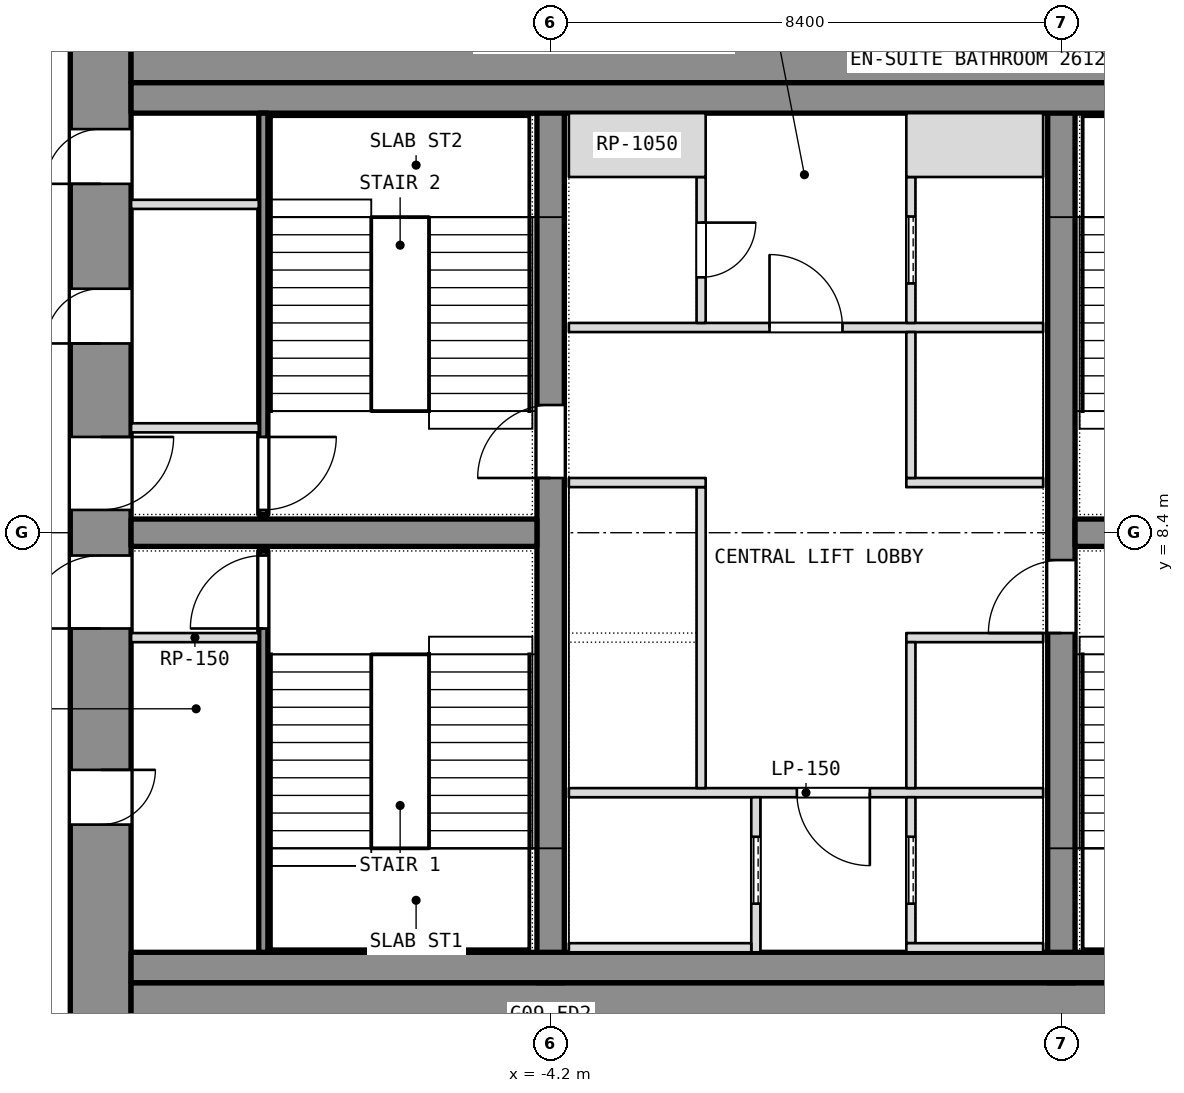
"""IFC4 building model, lengths in metres.
Left out: names, types, materials, properties, quantities, classifications, styles, units other than length and angle.
Written with IfcOpenShell. Run it as: python <this file> out.ifc"""

import sys

from ifc_helpers import new_model, si_unit, direction, frame, frame_2d, origin, place, context, subcontext, project, spatial, rectangle, extrude, element, fill, save


model = new_model("IFC4")
c1 = context("Model", 3, precision=1e-05, world=origin(), true_north=direction((0.0, 1.0)))
c2 = subcontext(c1, "Body", "Model", "MODEL_VIEW")
j1 = project(units=[si_unit("LENGTHUNIT", "METRE"), si_unit("PLANEANGLEUNIT", "RADIAN")], contexts=[c1])
p1 = place(None, origin())
s1 = spatial("IfcSite", under=j1, at=p1, CompositionType="ELEMENT")
p2 = place(p1, origin())
s2 = spatial("IfcBuilding", under=s1, at=p2, CompositionType="ELEMENT")
p3 = place(p2, frame((0.0, 0.0, 119.3)))
s3 = spatial("IfcBuildingStorey", under=s2, at=p3, CompositionType="ELEMENT", Elevation=119.3)
p4 = place(p3, frame((-11.6, 0.0, 0.0), z_axis=(0.0, 0.0, 1.0), x_axis=(0.0, 1.0, 0.0)))
e1 = element("IfcWall", 1, at=p4, inside=s3, PredefinedType="SHEAR", context=c2, shape_type="SweptSolid", body=[
    extrude(rectangle(XDim=16.8, YDim=1.0, at=frame_2d((8.4, 0.0))), origin(), (0.0, 0.0, 1.0), 3.6),
])
p5 = place(p4, frame((3.6, 0.0, 0.0)))
e2 = element("IfcOpeningElement", 2, at=p5, cuts=e1, PredefinedType="OPENING", context=c2, shape_type="SweptSolid", body=[
    extrude(rectangle(XDim=0.9, YDim=2.1, at=frame_2d((0.45, 1.05))), frame((0.0, 0.5, 0.0), z_axis=(0.0, -1.0, 0.0), x_axis=(1.0, 0.0, 0.0)), (0.0, 0.0, 1.0), 1.0),
])
p6 = place(p4, frame((6.825, 0.0, 0.0)))
e3 = element("IfcOpeningElement", 3, at=p6, cuts=e1, PredefinedType="OPENING", context=c2, shape_type="SweptSolid", body=[
    extrude(rectangle(XDim=1.2, YDim=2.1, at=frame_2d((0.6, 1.05))), frame((0.0, 0.5, 0.0), z_axis=(0.0, -1.0, 0.0), x_axis=(1.0, 0.0, 0.0)), (0.0, 0.0, 1.0), 1.0),
])
p7 = place(p4, frame((14.137, 0.0, 0.0)))
e4 = element("IfcOpeningElement", 4, at=p7, cuts=e1, PredefinedType="OPENING", context=c2, shape_type="SweptSolid", body=[
    extrude(rectangle(XDim=0.9, YDim=2.1, at=frame_2d((0.45, 1.05))), frame((0.0, 0.5, 0.0), z_axis=(0.0, -1.0, 0.0), x_axis=(1.0, 0.0, 0.0)), (0.0, 0.0, 1.0), 1.0),
])
p8 = place(p4, frame((11.512, 0.0, 0.0)))
e5 = element("IfcOpeningElement", 5, at=p8, cuts=e1, PredefinedType="OPENING", context=c2, shape_type="SweptSolid", body=[
    extrude(rectangle(XDim=0.9, YDim=2.1, at=frame_2d((0.45, 1.05))), frame((0.0, 0.5, 0.0), z_axis=(0.0, -1.0, 0.0), x_axis=(1.0, 0.0, 0.0)), (0.0, 0.0, 1.0), 1.0),
])
p9 = place(p4, frame((8.775, 0.0, 0.0)))
e6 = element("IfcOpeningElement", 6, at=p9, cuts=e1, PredefinedType="OPENING", context=c2, shape_type="SweptSolid", body=[
    extrude(rectangle(XDim=1.2, YDim=2.1, at=frame_2d((0.6, 1.05))), frame((0.0, 0.5, 0.0), z_axis=(0.0, -1.0, 0.0), x_axis=(1.0, 0.0, 0.0)), (0.0, 0.0, 1.0), 1.0),
])
for number, where, z_axis, x_axis in (
    (7, (-11.1, 0.5, 0.0), (0.0, 0.0, 1.0), (1.0, 0.0, 0.0)),
    (8, (-11.1, 16.3, 0.0), (0.0, 0.0, 1.0), (1.0, 0.0, 0.0)),
):
    element("IfcWall", number, at=place(p3, frame(where, z_axis=z_axis, x_axis=x_axis)), inside=s3, PredefinedType="SHEAR", context=c2, shape_type="SweptSolid", body=[
        extrude(rectangle(XDim=22.2, YDim=1.0, at=frame_2d((11.1, 0.0))), origin(), (0.0, 0.0, 1.0), 3.6),
    ])
p10 = place(p3, frame((-4.2, 1.0, 0.0), z_axis=(0.0, 0.0, 1.0), x_axis=(0.0, 1.0, 0.0)))
e9 = element("IfcWall", 9, at=p10, inside=s3, PredefinedType="SHEAR", context=c2, shape_type="SweptSolid", body=[
    extrude(rectangle(XDim=14.8, YDim=0.45, at=frame_2d((7.4, 0.0))), origin(), (0.0, 0.0, 1.0), 3.6),
])
p11 = place(p10, frame((8.3, 0.0, 0.0)))
e10 = element("IfcOpeningElement", 10, at=p11, cuts=e9, PredefinedType="OPENING", context=c2, shape_type="SweptSolid", body=[
    extrude(rectangle(XDim=1.2, YDim=2.1, at=frame_2d((0.6, 1.05))), frame((0.0, 0.225, 0.0), z_axis=(0.0, -1.0, 0.0), x_axis=(1.0, 0.0, 0.0)), (0.0, 0.0, 1.0), 0.45),
])
p12 = place(p3, frame((4.2, 1.0, 0.0), z_axis=(0.0, 0.0, 1.0), x_axis=(0.0, 1.0, 0.0)))
e11 = element("IfcWall", 11, at=p12, inside=s3, PredefinedType="SHEAR", context=c2, shape_type="SweptSolid", body=[
    extrude(rectangle(XDim=14.8, YDim=0.45, at=frame_2d((7.4, 0.0))), origin(), (0.0, 0.0, 1.0), 3.6),
])
p13 = place(p12, frame((5.75, 0.0, 0.0)))
e12 = element("IfcOpeningElement", 12, at=p13, cuts=e11, PredefinedType="OPENING", context=c2, shape_type="SweptSolid", body=[
    extrude(rectangle(XDim=1.2, YDim=2.1, at=frame_2d((0.6, 1.05))), frame((0.0, 0.225, 0.0), z_axis=(0.0, -1.0, 0.0), x_axis=(1.0, 0.0, 0.0)), (0.0, 0.0, 1.0), 0.45),
])
for number, where, z_axis, x_axis in (
    (13, (-11.1, 8.4, 0.0), (0.0, 0.0, 1.0), (1.0, 0.0, 0.0)),
    (14, (4.425, 8.4, 0.0), (0.0, 0.0, 1.0), (1.0, 0.0, 0.0)),
):
    element("IfcWall", number, at=place(p3, frame(where, z_axis=z_axis, x_axis=x_axis)), inside=s3, PredefinedType="SHEAR", context=c2, shape_type="SweptSolid", body=[
        extrude(rectangle(XDim=6.675, YDim=0.45, at=frame_2d((3.337, 0.0))), origin(), (0.0, 0.0, 1.0), 3.6),
    ])
for number, where, z_axis, x_axis in (
    (15, (-11.1, 1.25, 0.0), (0.0, 0.0, 1.0), (1.0, 0.0, 0.0)),
    (16, (-11.1, 15.55, 0.0), (0.0, 0.0, 1.0), (1.0, 0.0, 0.0)),
):
    element("IfcWall", number, at=place(p3, frame(where, z_axis=z_axis, x_axis=x_axis)), inside=s3, PredefinedType="PARTITIONING", context=c2, shape_type="SweptSolid", body=[
        extrude(rectangle(XDim=22.2, YDim=0.5, at=frame_2d((11.1, 0.0))), origin(), (0.0, 0.0, 1.0), 3.34),
    ])
p14 = place(p3, frame((-8.925, 1.5, 0.0), z_axis=(0.0, 0.0, 1.0), x_axis=(0.0, 1.0, 0.0)))
e17 = element("IfcWall", 17, at=p14, inside=s3, PredefinedType="SHEAR", context=c2, shape_type="SweptSolid", body=[
    extrude(rectangle(XDim=6.6, YDim=0.15, at=frame_2d((3.3, 0.0))), origin(), (0.0, 0.0, 1.0), 3.34),
])
p15 = place(p14, frame((5.325, 0.0, 0.0)))
e18 = element("IfcOpeningElement", 18, at=p15, cuts=e17, PredefinedType="OPENING", context=c2, shape_type="SweptSolid", body=[
    extrude(rectangle(XDim=1.2, YDim=2.1, at=frame_2d((0.6, 1.05))), frame((0.0, 0.075, 0.0), z_axis=(0.0, -1.0, 0.0), x_axis=(1.0, 0.0, 0.0)), (0.0, 0.0, 1.0), 0.15),
])
p16 = place(p3, frame((-11.1, 6.675, 0.0), z_axis=(0.0, 0.0, 1.0), x_axis=(1.0, 0.0, 0.0)))
e19 = element("IfcWall", 19, at=p16, inside=s3, PredefinedType="PARTITIONING", context=c2, shape_type="SweptSolid", body=[
    extrude(rectangle(XDim=2.1, YDim=0.15, at=frame_2d((1.05, 0.0))), origin(), (0.0, 0.0, 1.0), 3.34),
])
p17 = place(p3, frame((-8.925, 8.7, 0.0), z_axis=(0.0, 0.0, 1.0), x_axis=(0.0, 1.0, 0.0)))
e20 = element("IfcWall", 20, at=p17, inside=s3, PredefinedType="SHEAR", context=c2, shape_type="SweptSolid", body=[
    extrude(rectangle(XDim=6.6, YDim=0.15, at=frame_2d((3.3, 0.0))), origin(), (0.0, 0.0, 1.0), 3.34),
])
p18 = place(p17, frame((0.075, 0.0, 0.0)))
e21 = element("IfcOpeningElement", 21, at=p18, cuts=e20, PredefinedType="OPENING", context=c2, shape_type="SweptSolid", body=[
    extrude(rectangle(XDim=1.2, YDim=2.1, at=frame_2d((0.6, 1.05))), frame((0.0, 0.075, 0.0), z_axis=(0.0, -1.0, 0.0), x_axis=(1.0, 0.0, 0.0)), (0.0, 0.0, 1.0), 0.15),
])
for number, where, z_axis, x_axis in (
    (22, (-11.1, 10.125, 0.0), (0.0, 0.0, 1.0), (1.0, 0.0, 0.0)),
    (23, (-11.1, 13.8, 0.0), (0.0, 0.0, 1.0), (1.0, 0.0, 0.0)),
):
    element("IfcWall", number, at=place(p3, frame(where, z_axis=z_axis, x_axis=x_axis)), inside=s3, PredefinedType="PARTITIONING", context=c2, shape_type="SweptSolid", body=[
        extrude(rectangle(XDim=2.1, YDim=0.15, at=frame_2d((1.05, 0.0))), origin(), (0.0, 0.0, 1.0), 3.34),
    ])
p19 = place(p3, frame((-3.9, 4.125, 0.0), z_axis=(0.0, 0.0, 1.0), x_axis=(1.0, 0.0, 0.0)))
e24 = element("IfcWall", 24, at=p19, inside=s3, PredefinedType="PARTITIONING", context=c2, shape_type="SweptSolid", body=[
    extrude(rectangle(XDim=7.8, YDim=0.15, at=frame_2d((3.9, 0.0))), origin(), (0.0, 0.0, 1.0), 3.34),
])
p20 = place(p19, frame((3.75, 0.0, 0.0)))
e25 = element("IfcOpeningElement", 25, at=p20, cuts=e24, PredefinedType="OPENING", context=c2, shape_type="SweptSolid", body=[
    extrude(rectangle(XDim=1.2, YDim=2.1, at=frame_2d((0.6, 1.05))), frame((0.0, 0.075, 0.0), z_axis=(0.0, -1.0, 0.0), x_axis=(1.0, 0.0, 0.0)), (0.0, 0.0, 1.0), 0.15),
])
p21 = place(p3, frame((-3.9, 11.775, 0.0), z_axis=(0.0, 0.0, 1.0), x_axis=(1.0, 0.0, 0.0)))
e26 = element("IfcWall", 26, at=p21, inside=s3, PredefinedType="PARTITIONING", context=c2, shape_type="SweptSolid", body=[
    extrude(rectangle(XDim=7.8, YDim=0.15, at=frame_2d((3.9, 0.0))), origin(), (0.0, 0.0, 1.0), 3.34),
])
p22 = place(p21, frame((3.3, 0.0, 0.0)))
e27 = element("IfcOpeningElement", 27, at=p22, cuts=e26, PredefinedType="OPENING", context=c2, shape_type="SweptSolid", body=[
    extrude(rectangle(XDim=1.2, YDim=2.1, at=frame_2d((0.6, 1.05))), frame((0.0, 0.075, 0.0), z_axis=(0.0, -1.0, 0.0), x_axis=(1.0, 0.0, 0.0)), (0.0, 0.0, 1.0), 0.15),
])
p23 = place(p3, frame((-0.825, 1.5, 0.0), z_axis=(0.0, 0.0, 1.0), x_axis=(0.0, 1.0, 0.0)))
e28 = element("IfcWall", 28, at=p23, inside=s3, PredefinedType="SHEAR", context=c2, shape_type="SweptSolid", body=[
    extrude(rectangle(XDim=2.55, YDim=0.15, at=frame_2d((1.275, 0.0))), origin(), (0.0, 0.0, 1.0), 3.6),
])
p24 = place(p23, frame((0.8, 0.0, 0.0)))
e29 = element("IfcOpeningElement", 29, at=p24, cuts=e28, PredefinedType="OPENING", context=c2, shape_type="SweptSolid", body=[
    extrude(rectangle(XDim=1.1, YDim=2.1, at=frame_2d((0.55, 1.05))), frame((0.0, 0.075, 0.0), z_axis=(0.0, -1.0, 0.0), x_axis=(1.0, 0.0, 0.0)), (0.0, 0.0, 1.0), 0.15),
])
p25 = place(p3, frame((-3.9, 1.575, 0.0), z_axis=(0.0, 0.0, 1.0), x_axis=(1.0, 0.0, 0.0)))
e30 = element("IfcWall", 30, at=p25, inside=s3, PredefinedType="SHEAR", context=c2, shape_type="SweptSolid", body=[
    extrude(rectangle(XDim=3.0, YDim=0.15, at=frame_2d((1.5, 0.0))), origin(), (0.0, 0.0, 1.0), 3.6),
])
p26 = place(p3, frame((-1.725, 4.2, 0.0), z_axis=(0.0, 0.0, 1.0), x_axis=(0.0, 1.0, 0.0)))
e31 = element("IfcWall", 31, at=p26, inside=s3, PredefinedType="SHEAR", context=c2, shape_type="SweptSolid", body=[
    extrude(rectangle(XDim=4.95, YDim=0.15, at=frame_2d((2.475, 0.0))), origin(), (0.0, 0.0, 1.0), 3.6),
])
p27 = place(p3, frame((-3.9, 9.225, 0.0), z_axis=(0.0, 0.0, 1.0), x_axis=(1.0, 0.0, 0.0)))
e32 = element("IfcWall", 32, at=p27, inside=s3, PredefinedType="SHEAR", context=c2, shape_type="SweptSolid", body=[
    extrude(rectangle(XDim=2.25, YDim=0.15, at=frame_2d((1.125, 0.0))), origin(), (0.0, 0.0, 1.0), 3.6),
])
p28 = place(p3, frame((-1.725, 11.85, 0.0), z_axis=(0.0, 0.0, 1.0), x_axis=(0.0, 1.0, 0.0)))
e33 = element("IfcWall", 33, at=p28, inside=s3, PredefinedType="PARTITIONING", context=c2, shape_type="SweptSolid", body=[
    extrude(rectangle(XDim=2.4, YDim=0.15, at=frame_2d((1.2, 0.0))), origin(), (0.0, 0.0, 1.0), 3.34),
])
p29 = place(p28, frame((0.75, 0.0, 0.0)))
e34 = element("IfcOpeningElement", 34, at=p29, cuts=e33, PredefinedType="OPENING", context=c2, shape_type="SweptSolid", body=[
    extrude(rectangle(XDim=0.9, YDim=2.1, at=frame_2d((0.45, 1.05))), frame((0.0, 0.075, 0.0), z_axis=(0.0, -1.0, 0.0), x_axis=(1.0, 0.0, 0.0)), (0.0, 0.0, 1.0), 0.15),
])
p30 = place(p3, frame((-3.9, 14.775, 0.0), z_axis=(0.0, 0.0, 1.0), x_axis=(1.0, 0.0, 0.0)))
e35 = element("IfcWall", 35, at=p30, inside=s3, PredefinedType="PARTITIONING", context=c2, shape_type="SweptSolid", body=[
    extrude(rectangle(XDim=2.25, YDim=1.05, at=frame_2d((1.125, 0.0))), origin(), (0.0, 0.0, 1.0), 3.34),
])
p31 = place(p3, frame((1.725, 1.65, 0.0), z_axis=(0.0, 0.0, 1.0), x_axis=(0.0, 1.0, 0.0)))
e36 = element("IfcWall", 36, at=p31, inside=s3, PredefinedType="SHEAR", context=c2, shape_type="SweptSolid", body=[
    extrude(rectangle(XDim=2.4, YDim=0.15, at=frame_2d((1.2, 0.0))), origin(), (0.0, 0.0, 1.0), 3.6),
])
p32 = place(p31, frame((0.65, 0.0, 0.0)))
e37 = element("IfcOpeningElement", 37, at=p32, cuts=e36, PredefinedType="OPENING", context=c2, shape_type="SweptSolid", body=[
    extrude(rectangle(XDim=1.1, YDim=2.1, at=frame_2d((0.55, 1.05))), frame((0.0, 0.075, 0.0), z_axis=(0.0, -1.0, 0.0), x_axis=(1.0, 0.0, 0.0)), (0.0, 0.0, 1.0), 0.15),
])
p33 = place(p3, frame((1.65, 1.575, 0.0), z_axis=(0.0, 0.0, 1.0), x_axis=(1.0, 0.0, 0.0)))
e38 = element("IfcWall", 38, at=p33, inside=s3, PredefinedType="SHEAR", context=c2, shape_type="SweptSolid", body=[
    extrude(rectangle(XDim=2.25, YDim=0.15, at=frame_2d((1.125, 0.0))), origin(), (0.0, 0.0, 1.0), 3.6),
])
p34 = place(p3, frame((1.725, 11.85, 0.0), z_axis=(0.0, 0.0, 1.0), x_axis=(0.0, 1.0, 0.0)))
e39 = element("IfcWall", 39, at=p34, inside=s3, PredefinedType="SHEAR", context=c2, shape_type="SweptSolid", body=[
    extrude(rectangle(XDim=2.4, YDim=0.15, at=frame_2d((1.2, 0.0))), origin(), (0.0, 0.0, 1.0), 3.6),
])
p35 = place(p34, frame((0.65, 0.0, 0.0)))
e40 = element("IfcOpeningElement", 40, at=p35, cuts=e39, PredefinedType="OPENING", context=c2, shape_type="SweptSolid", body=[
    extrude(rectangle(XDim=1.1, YDim=2.1, at=frame_2d((0.55, 1.05))), frame((0.0, 0.075, 0.0), z_axis=(0.0, -1.0, 0.0), x_axis=(1.0, 0.0, 0.0)), (0.0, 0.0, 1.0), 0.15),
])
p36 = place(p3, frame((1.65, 14.775, 0.0), z_axis=(0.0, 0.0, 1.0), x_axis=(1.0, 0.0, 0.0)))
e41 = element("IfcWall", 41, at=p36, inside=s3, PredefinedType="SHEAR", context=c2, shape_type="SweptSolid", body=[
    extrude(rectangle(XDim=2.25, YDim=1.05, at=frame_2d((1.125, 0.0))), origin(), (0.0, 0.0, 1.0), 3.6),
])
for number, where, z_axis, x_axis in (
    (42, (1.65, 6.675, 0.0), (0.0, 0.0, 1.0), (1.0, 0.0, 0.0)),
    (43, (1.65, 9.225, 0.0), (0.0, 0.0, 1.0), (1.0, 0.0, 0.0)),
):
    element("IfcWall", number, at=place(p3, frame(where, z_axis=z_axis, x_axis=x_axis)), inside=s3, PredefinedType="SHEAR", context=c2, shape_type="SweptSolid", body=[
        extrude(rectangle(XDim=2.25, YDim=0.15, at=frame_2d((1.125, 0.0))), origin(), (0.0, 0.0, 1.0), 3.6),
    ])
p37 = place(p3, frame((1.725, 4.2, 0.0), z_axis=(0.0, 0.0, 1.0), x_axis=(0.0, 1.0, 0.0)))
e44 = element("IfcWall", 44, at=p37, inside=s3, PredefinedType="SHEAR", context=c2, shape_type="SweptSolid", body=[
    extrude(rectangle(XDim=2.4, YDim=0.15, at=frame_2d((1.2, 0.0))), origin(), (0.0, 0.0, 1.0), 3.6),
])
p38 = place(p3, frame((1.725, 9.3, 0.0), z_axis=(0.0, 0.0, 1.0), x_axis=(0.0, 1.0, 0.0)))
e45 = element("IfcWall", 45, at=p38, inside=s3, PredefinedType="SHEAR", context=c2, shape_type="SweptSolid", body=[
    extrude(rectangle(XDim=2.4, YDim=0.15, at=frame_2d((1.2, 0.0))), origin(), (0.0, 0.0, 1.0), 3.6),
])
p39 = place(p5, origin())
e46 = element("IfcDoor", 46, at=p39, inside=s3, OperationType="SINGLE_SWING_LEFT", PredefinedType="DOOR", context=c2, shape_type="SweptSolid", body=[
    extrude(rectangle(XDim=0.9, YDim=2.1, at=frame_2d((0.45, 1.05))), frame((0.0, 0.025, 0.0), z_axis=(0.0, -1.0, 0.0), x_axis=(1.0, 0.0, 0.0)), (0.0, 0.0, 1.0), 0.05),
])
fill(e2, e46)
p40 = place(p6, origin())
e47 = element("IfcDoor", 47, at=p40, inside=s3, OperationType="SINGLE_SWING_LEFT", PredefinedType="DOOR", context=c2, shape_type="SweptSolid", body=[
    extrude(rectangle(XDim=1.2, YDim=2.1, at=frame_2d((0.6, 1.05))), frame((0.0, 0.025, 0.0), z_axis=(0.0, -1.0, 0.0), x_axis=(1.0, 0.0, 0.0)), (0.0, 0.0, 1.0), 0.05),
])
fill(e3, e47)
p41 = place(p15, origin())
e48 = element("IfcDoor", 48, at=p41, inside=s3, OperationType="SINGLE_SWING_LEFT", PredefinedType="DOOR", context=c2, shape_type="SweptSolid", body=[
    extrude(rectangle(XDim=1.2, YDim=2.1, at=frame_2d((0.6, 1.05))), frame((0.0, 0.025, 0.0), z_axis=(0.0, -1.0, 0.0), x_axis=(1.0, 0.0, 0.0)), (0.0, 0.0, 1.0), 0.05),
])
fill(e18, e48)
p42 = place(p7, origin())
e49 = element("IfcDoor", 49, at=p42, inside=s3, OperationType="SINGLE_SWING_LEFT", PredefinedType="DOOR", context=c2, shape_type="SweptSolid", body=[
    extrude(rectangle(XDim=0.9, YDim=2.1, at=frame_2d((0.45, 1.05))), frame((0.0, 0.025, 0.0), z_axis=(0.0, -1.0, 0.0), x_axis=(1.0, 0.0, 0.0)), (0.0, 0.0, 1.0), 0.05),
])
fill(e4, e49)
p43 = place(p8, origin())
e50 = element("IfcDoor", 50, at=p43, inside=s3, OperationType="SINGLE_SWING_LEFT", PredefinedType="DOOR", context=c2, shape_type="SweptSolid", body=[
    extrude(rectangle(XDim=0.9, YDim=2.1, at=frame_2d((0.45, 1.05))), frame((0.0, 0.025, 0.0), z_axis=(0.0, -1.0, 0.0), x_axis=(1.0, 0.0, 0.0)), (0.0, 0.0, 1.0), 0.05),
])
fill(e5, e50)
p44 = place(p9, origin())
e51 = element("IfcDoor", 51, at=p44, inside=s3, OperationType="SINGLE_SWING_LEFT", PredefinedType="DOOR", context=c2, shape_type="SweptSolid", body=[
    extrude(rectangle(XDim=1.2, YDim=2.1, at=frame_2d((0.6, 1.05))), frame((0.0, 0.025, 0.0), z_axis=(0.0, -1.0, 0.0), x_axis=(1.0, 0.0, 0.0)), (0.0, 0.0, 1.0), 0.05),
])
fill(e6, e51)
p45 = place(p18, origin())
e52 = element("IfcDoor", 52, at=p45, inside=s3, OperationType="SINGLE_SWING_LEFT", PredefinedType="DOOR", context=c2, shape_type="SweptSolid", body=[
    extrude(rectangle(XDim=1.2, YDim=2.1, at=frame_2d((0.6, 1.05))), frame((0.0, 0.025, 0.0), z_axis=(0.0, -1.0, 0.0), x_axis=(1.0, 0.0, 0.0)), (0.0, 0.0, 1.0), 0.05),
])
fill(e21, e52)
p46 = place(p24, origin())
e53 = element("IfcDoor", 53, at=p46, inside=s3, OperationType="SLIDING_TO_LEFT", PredefinedType="DOOR", context=c2, shape_type="SweptSolid", body=[
    extrude(rectangle(XDim=1.1, YDim=2.1, at=frame_2d((0.55, 1.05))), frame((0.0, 0.025, 0.0), z_axis=(0.0, -1.0, 0.0), x_axis=(1.0, 0.0, 0.0)), (0.0, 0.0, 1.0), 0.05),
])
fill(e29, e53)
p47 = place(p32, origin())
e54 = element("IfcDoor", 54, at=p47, inside=s3, OperationType="SLIDING_TO_LEFT", PredefinedType="DOOR", context=c2, shape_type="SweptSolid", body=[
    extrude(rectangle(XDim=1.1, YDim=2.1, at=frame_2d((0.55, 1.05))), frame((0.0, 0.025, 0.0), z_axis=(0.0, -1.0, 0.0), x_axis=(1.0, 0.0, 0.0)), (0.0, 0.0, 1.0), 0.05),
])
fill(e37, e54)
p48 = place(p35, origin())
e55 = element("IfcDoor", 55, at=p48, inside=s3, OperationType="SLIDING_TO_LEFT", PredefinedType="DOOR", context=c2, shape_type="SweptSolid", body=[
    extrude(rectangle(XDim=1.1, YDim=2.1, at=frame_2d((0.55, 1.05))), frame((0.0, 0.025, 0.0), z_axis=(0.0, -1.0, 0.0), x_axis=(1.0, 0.0, 0.0)), (0.0, 0.0, 1.0), 0.05),
])
fill(e40, e55)
p49 = place(p20, origin())
e56 = element("IfcDoor", 56, at=p49, inside=s3, OperationType="SINGLE_SWING_LEFT", PredefinedType="DOOR", context=c2, shape_type="SweptSolid", body=[
    extrude(rectangle(XDim=1.2, YDim=2.1, at=frame_2d((0.6, 1.05))), frame((0.0, 0.025, 0.0), z_axis=(0.0, -1.0, 0.0), x_axis=(1.0, 0.0, 0.0)), (0.0, 0.0, 1.0), 0.05),
])
fill(e25, e56)
p50 = place(p22, origin())
e57 = element("IfcDoor", 57, at=p50, inside=s3, OperationType="SINGLE_SWING_LEFT", PredefinedType="DOOR", context=c2, shape_type="SweptSolid", body=[
    extrude(rectangle(XDim=1.2, YDim=2.1, at=frame_2d((0.6, 1.05))), frame((0.0, 0.025, 0.0), z_axis=(0.0, -1.0, 0.0), x_axis=(1.0, 0.0, 0.0)), (0.0, 0.0, 1.0), 0.05),
])
fill(e27, e57)
p51 = place(p29, origin())
e58 = element("IfcDoor", 58, at=p51, inside=s3, OperationType="SINGLE_SWING_LEFT", PredefinedType="DOOR", context=c2, shape_type="SweptSolid", body=[
    extrude(rectangle(XDim=0.9, YDim=2.1, at=frame_2d((0.45, 1.05))), frame((0.0, 0.025, 0.0), z_axis=(0.0, -1.0, 0.0), x_axis=(1.0, 0.0, 0.0)), (0.0, 0.0, 1.0), 0.05),
])
fill(e34, e58)
p52 = place(p11, origin())
e59 = element("IfcDoor", 59, at=p52, inside=s3, OperationType="SINGLE_SWING_LEFT", PredefinedType="DOOR", context=c2, shape_type="SweptSolid", body=[
    extrude(rectangle(XDim=1.2, YDim=2.1, at=frame_2d((0.6, 1.05))), frame((0.0, 0.025, 0.0), z_axis=(0.0, -1.0, 0.0), x_axis=(1.0, 0.0, 0.0)), (0.0, 0.0, 1.0), 0.05),
])
fill(e10, e59)
p53 = place(p13, origin())
e60 = element("IfcDoor", 60, at=p53, inside=s3, OperationType="SINGLE_SWING_LEFT", PredefinedType="DOOR", context=c2, shape_type="SweptSolid", body=[
    extrude(rectangle(XDim=1.2, YDim=2.1, at=frame_2d((0.6, 1.05))), frame((0.0, 0.025, 0.0), z_axis=(0.0, -1.0, 0.0), x_axis=(1.0, 0.0, 0.0)), (0.0, 0.0, 1.0), 0.05),
])
fill(e12, e60)
save(model, sys.argv[1])
